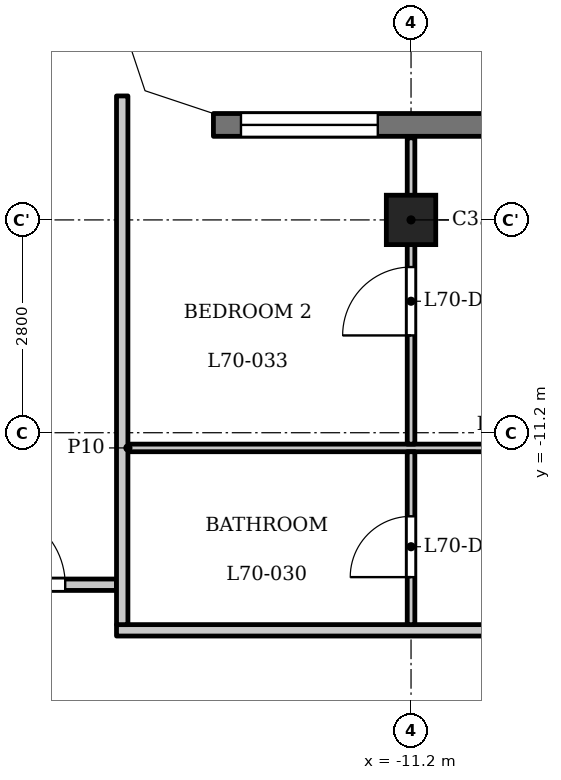
"""IFC4 building model, lengths in metres.
Left out: names, types, materials, properties, quantities, classifications, styles, units other than length and angle.
Written with IfcOpenShell. Run it as: python <this file> out.ifc"""

import sys

from ifc_helpers import new_model, si_unit, direction, frame, frame_2d, origin, origin_2d, place, context, subcontext, project, spatial, polyline, rectangle, outline, extrude, element, fill, save


model = new_model("IFC4")
c1 = context("Model", 3, precision=1e-05, world=origin(), true_north=direction((0.0, 1.0)))
c2 = subcontext(c1, "Body", "Model", "MODEL_VIEW")
j1 = project(units=[si_unit("LENGTHUNIT", "METRE"), si_unit("PLANEANGLEUNIT", "RADIAN")], contexts=[c1])
p1 = place(None, origin())
s1 = spatial("IfcSite", under=j1, at=p1, CompositionType="ELEMENT")
p2 = place(p1, origin())
s2 = spatial("IfcBuilding", under=s1, at=p2, CompositionType="ELEMENT")
p3 = place(p2, frame((0.0, 0.0, 269.7)))
s3 = spatial("IfcBuildingStorey", under=s2, at=p3, CompositionType="ELEMENT", Elevation=269.7)
p4 = place(p3, frame((-11.2, -8.4, 0.0), z_axis=(0.0, 0.0, 1.0), x_axis=(1.0, 0.0, 0.0)))
e1 = element("IfcColumn", 1, at=p4, inside=s3, PredefinedType="COLUMN", context=c2, shape_type="SweptSolid", body=[
    extrude(rectangle(XDim=0.65, YDim=0.65, at=origin_2d()), origin(), (0.0, 0.0, 1.0), 3.5),
])
p5 = place(p3, frame((13.8, -7.15, 0.0), z_axis=(0.0, 0.0, 1.0), x_axis=(-1.0, 0.0, 0.0)))
e2 = element("IfcWall", 2, at=p5, inside=s3, PredefinedType="SOLIDWALL", context=c2, shape_type="SweptSolid", body=[
    extrude(rectangle(XDim=27.6, YDim=0.3, at=frame_2d((13.8, 0.0))), origin(), (0.0, 0.0, 1.0), 3.2),
])
p6 = place(p5, frame((0.363, 0.0, 0.9)))
e3 = element("IfcOpeningElement", 3, at=p6, cuts=e2, PredefinedType="OPENING", context=c2, shape_type="SweptSolid", body=[
    extrude(rectangle(XDim=1.8, YDim=1.25, at=frame_2d((0.9, 0.625))), frame((0.0, 0.16, 0.0), z_axis=(0.0, -1.0, 0.0), x_axis=(1.0, 0.0, 0.0)), (0.0, 0.0, 1.0), 0.32),
])
p7 = place(p5, frame((3.6, 0.0, 1.2)))
e4 = element("IfcOpeningElement", 4, at=p7, cuts=e2, PredefinedType="OPENING", context=c2, shape_type="SweptSolid", body=[
    extrude(rectangle(XDim=3.6, YDim=0.95, at=frame_2d((1.8, 0.475))), frame((0.0, 0.16, 0.0), z_axis=(0.0, -1.0, 0.0), x_axis=(1.0, 0.0, 0.0)), (0.0, 0.0, 1.0), 0.32),
])
p8 = place(p5, frame((9.2, 0.0, 1.2)))
e5 = element("IfcOpeningElement", 5, at=p8, cuts=e2, PredefinedType="OPENING", context=c2, shape_type="SweptSolid", body=[
    extrude(rectangle(XDim=3.6, YDim=0.95, at=frame_2d((1.8, 0.475))), frame((0.0, 0.16, 0.0), z_axis=(0.0, -1.0, 0.0), x_axis=(1.0, 0.0, 0.0)), (0.0, 0.0, 1.0), 0.32),
])
p9 = place(p5, frame((14.8, 0.0, 1.2)))
e6 = element("IfcOpeningElement", 6, at=p9, cuts=e2, PredefinedType="OPENING", context=c2, shape_type="SweptSolid", body=[
    extrude(rectangle(XDim=3.6, YDim=0.95, at=frame_2d((1.8, 0.475))), frame((0.0, 0.16, 0.0), z_axis=(0.0, -1.0, 0.0), x_axis=(1.0, 0.0, 0.0)), (0.0, 0.0, 1.0), 0.32),
])
p10 = place(p5, frame((20.4, 0.0, 1.2)))
e7 = element("IfcOpeningElement", 7, at=p10, cuts=e2, PredefinedType="OPENING", context=c2, shape_type="SweptSolid", body=[
    extrude(rectangle(XDim=3.6, YDim=0.95, at=frame_2d((1.8, 0.475))), frame((0.0, 0.16, 0.0), z_axis=(0.0, -1.0, 0.0), x_axis=(1.0, 0.0, 0.0)), (0.0, 0.0, 1.0), 0.32),
])
p11 = place(p5, frame((25.438, 0.0, 0.9)))
e8 = element("IfcOpeningElement", 8, at=p11, cuts=e2, PredefinedType="OPENING", context=c2, shape_type="SweptSolid", body=[
    extrude(rectangle(XDim=1.8, YDim=1.25, at=frame_2d((0.9, 0.625))), frame((0.0, 0.16, 0.0), z_axis=(0.0, -1.0, 0.0), x_axis=(1.0, 0.0, 0.0)), (0.0, 0.0, 1.0), 0.32),
])
p12 = place(p3, frame((-15.075, -13.8, 0.0), z_axis=(0.0, 0.0, 1.0), x_axis=(1.0, 0.0, 0.0)))
e9 = element("IfcWall", 9, at=p12, inside=s3, PredefinedType="PARTITIONING", context=c2, shape_type="SweptSolid", body=[
    extrude(rectangle(XDim=30.15, YDim=0.15, at=frame_2d((15.075, 0.0))), origin(), (0.0, 0.0, 1.0), 3.2),
])
p13 = place(p12, frame((10.175, 0.0, 0.0)))
e10 = element("IfcOpeningElement", 10, at=p13, cuts=e9, PredefinedType="OPENING", context=c2, shape_type="SweptSolid", body=[
    extrude(rectangle(XDim=1.0, YDim=2.1, at=frame_2d((0.5, 1.05))), frame((0.0, 0.085, 0.0), z_axis=(0.0, -1.0, 0.0), x_axis=(1.0, 0.0, 0.0)), (0.0, 0.0, 1.0), 0.17),
])
p14 = place(p12, frame((15.775, 0.0, 0.0)))
e11 = element("IfcOpeningElement", 11, at=p14, cuts=e9, PredefinedType="OPENING", context=c2, shape_type="SweptSolid", body=[
    extrude(rectangle(XDim=1.0, YDim=2.1, at=frame_2d((0.5, 1.05))), frame((0.0, 0.085, 0.0), z_axis=(0.0, -1.0, 0.0), x_axis=(1.0, 0.0, 0.0)), (0.0, 0.0, 1.0), 0.17),
])
p15 = place(p3, frame((-17.4, -13.2, 0.0), z_axis=(0.0, 0.0, 1.0), x_axis=(1.0, 0.0, 0.0)))
e12 = element("IfcWall", 12, at=p15, inside=s3, PredefinedType="PARTITIONING", context=c2, shape_type="SweptSolid", body=[
    extrude(rectangle(XDim=2.325, YDim=0.15, at=frame_2d((1.163, 0.0))), origin(), (0.0, 0.0, 1.0), 3.2),
])
p16 = place(p15, frame((0.65, 0.0, 0.0)))
e13 = element("IfcOpeningElement", 13, at=p16, cuts=e12, PredefinedType="OPENING", context=c2, shape_type="SweptSolid", body=[
    extrude(rectangle(XDim=1.0, YDim=2.1, at=frame_2d((0.5, 1.05))), frame((0.0, 0.085, 0.0), z_axis=(0.0, -1.0, 0.0), x_axis=(1.0, 0.0, 0.0)), (0.0, 0.0, 1.0), 0.17),
])
p17 = place(p3, frame((-14.925, -11.4, 0.0), z_axis=(0.0, 0.0, 1.0), x_axis=(1.0, 0.0, 0.0)))
e14 = element("IfcWall", 14, at=p17, inside=s3, PredefinedType="PARTITIONING", context=c2, shape_type="SweptSolid", body=[
    extrude(rectangle(XDim=29.85, YDim=0.1, at=frame_2d((14.925, 0.0))), origin(), (0.0, 0.0, 1.0), 3.2),
])
p18 = place(p17, frame((13.375, 0.0, 0.0)))
e15 = element("IfcOpeningElement", 15, at=p18, cuts=e14, PredefinedType="OPENING", context=c2, shape_type="SweptSolid", body=[
    extrude(rectangle(XDim=0.9, YDim=2.1, at=frame_2d((0.45, 1.05))), frame((0.0, 0.06, 0.0), z_axis=(0.0, -1.0, 0.0), x_axis=(1.0, 0.0, 0.0)), (0.0, 0.0, 1.0), 0.12),
])
p19 = place(p17, frame((4.775, 0.0, 0.0)))
e16 = element("IfcOpeningElement", 16, at=p19, cuts=e14, PredefinedType="OPENING", context=c2, shape_type="SweptSolid", body=[
    extrude(rectangle(XDim=0.9, YDim=2.1, at=frame_2d((0.45, 1.05))), frame((0.0, 0.06, 0.0), z_axis=(0.0, -1.0, 0.0), x_axis=(1.0, 0.0, 0.0)), (0.0, 0.0, 1.0), 0.12),
])
p20 = place(p17, frame((18.475, 0.0, 0.0)))
e17 = element("IfcOpeningElement", 17, at=p20, cuts=e14, PredefinedType="OPENING", context=c2, shape_type="SweptSolid", body=[
    extrude(rectangle(XDim=0.9, YDim=2.1, at=frame_2d((0.45, 1.05))), frame((0.0, 0.06, 0.0), z_axis=(0.0, -1.0, 0.0), x_axis=(1.0, 0.0, 0.0)), (0.0, 0.0, 1.0), 0.12),
])
p21 = place(p17, frame((21.825, 0.0, 0.0)))
e18 = element("IfcOpeningElement", 18, at=p21, cuts=e14, PredefinedType="OPENING", context=c2, shape_type="SweptSolid", body=[
    extrude(rectangle(XDim=0.9, YDim=2.1, at=frame_2d((0.45, 1.05))), frame((0.0, 0.06, 0.0), z_axis=(0.0, -1.0, 0.0), x_axis=(1.0, 0.0, 0.0)), (0.0, 0.0, 1.0), 0.12),
])
p22 = place(p3, frame((-15.0, -13.725, 0.0), z_axis=(0.0, 0.0, 1.0), x_axis=(0.0, 1.0, 0.0)))
e19 = element("IfcWall", 19, at=p22, inside=s3, PredefinedType="PARTITIONING", context=c2, shape_type="SweptSolid", body=[
    extrude(rectangle(XDim=6.956, YDim=0.15, at=frame_2d((3.478, 0.0))), origin(), (0.0, 0.0, 1.0), 3.2),
])
p23 = place(p3, frame((-11.2, -13.725, 0.0), z_axis=(0.0, 0.0, 1.0), x_axis=(0.0, 1.0, 0.0)))
e20 = element("IfcWall", 20, at=p23, inside=s3, PredefinedType="PARTITIONING", context=c2, shape_type="SweptSolid", body=[
    extrude(rectangle(XDim=2.275, YDim=0.1, at=frame_2d((1.138, 0.0))), origin(), (0.0, 0.0, 1.0), 3.2),
])
p24 = place(p23, frame((0.625, 0.0, 0.0)))
e21 = element("IfcOpeningElement", 21, at=p24, cuts=e20, PredefinedType="OPENING", context=c2, shape_type="SweptSolid", body=[
    extrude(rectangle(XDim=0.8, YDim=2.1, at=frame_2d((0.4, 1.05))), frame((0.0, 0.06, 0.0), z_axis=(0.0, -1.0, 0.0), x_axis=(1.0, 0.0, 0.0)), (0.0, 0.0, 1.0), 0.12),
])
p25 = place(p3, frame((-11.2, -11.35, 0.0), z_axis=(0.0, 0.0, 1.0), x_axis=(0.0, 1.0, 0.0)))
e22 = element("IfcWall", 22, at=p25, inside=s3, PredefinedType="PARTITIONING", context=c2, shape_type="SweptSolid", body=[
    extrude(rectangle(XDim=4.03, YDim=0.1, at=frame_2d((2.015, 0.0))), origin(), (0.0, 0.0, 1.0), 3.2),
])
p26 = place(p25, frame((1.43, 0.0, 0.0)))
e23 = element("IfcOpeningElement", 23, at=p26, cuts=e22, PredefinedType="OPENING", context=c2, shape_type="SweptSolid", body=[
    extrude(rectangle(XDim=0.9, YDim=2.1, at=frame_2d((0.45, 1.05))), frame((0.0, 0.06, 0.0), z_axis=(0.0, -1.0, 0.0), x_axis=(1.0, 0.0, 0.0)), (0.0, 0.0, 1.0), 0.12),
])
p27 = place(p3, origin())
e24 = element("IfcWall", 24, at=p27, inside=s3, PredefinedType="SOLIDWALL", context=c2, shape_type="SweptSolid", body=[
    extrude(outline(polyline([(-14.937, -6.937), (-13.849, -7.3), (-13.8, -7.3), (-13.8, -7.0), (-14.7, -6.7), (-15.0, -5.8), (-15.3, -5.8), (-15.3, -5.849), (-14.937, -6.937)])), origin(), (0.0, 0.0, 1.0), 3.2),
])
p28 = place(p16, origin())
e25 = element("IfcDoor", 25, at=p28, inside=s3, OperationType="SINGLE_SWING_RIGHT", PredefinedType="DOOR", context=c2, shape_type="SweptSolid", body=[
    extrude(rectangle(XDim=1.0, YDim=2.1, at=frame_2d((0.5, 1.05))), frame((0.0, 0.025, 0.0), z_axis=(0.0, -1.0, 0.0), x_axis=(1.0, 0.0, 0.0)), (0.0, 0.0, 1.0), 0.05),
])
fill(e13, e25)
p29 = place(p24, origin())
e26 = element("IfcDoor", 26, at=p29, inside=s3, OperationType="SINGLE_SWING_RIGHT", PredefinedType="DOOR", context=c2, shape_type="SweptSolid", body=[
    extrude(rectangle(XDim=0.8, YDim=2.1, at=frame_2d((0.4, 1.05))), frame((0.0, 0.025, 0.0), z_axis=(0.0, -1.0, 0.0), x_axis=(1.0, 0.0, 0.0)), (0.0, 0.0, 1.0), 0.05),
])
fill(e21, e26)
p30 = place(p26, origin())
e27 = element("IfcDoor", 27, at=p30, inside=s3, OperationType="SINGLE_SWING_RIGHT", PredefinedType="DOOR", context=c2, shape_type="SweptSolid", body=[
    extrude(rectangle(XDim=0.9, YDim=2.1, at=frame_2d((0.45, 1.05))), frame((0.0, 0.025, 0.0), z_axis=(0.0, -1.0, 0.0), x_axis=(1.0, 0.0, 0.0)), (0.0, 0.0, 1.0), 0.05),
])
fill(e23, e27)
p31 = place(p11, origin())
e28 = element("IfcWindow", 28, at=p31, inside=s3, PartitioningType="SINGLE_PANEL", PredefinedType="WINDOW", context=c2, shape_type="SweptSolid", body=[
    extrude(rectangle(XDim=1.8, YDim=1.25, at=frame_2d((0.9, 0.625))), frame((0.0, 0.03, 0.0), z_axis=(0.0, -1.0, 0.0), x_axis=(1.0, 0.0, 0.0)), (0.0, 0.0, 1.0), 0.06),
])
fill(e8, e28)
save(model, sys.argv[1])
